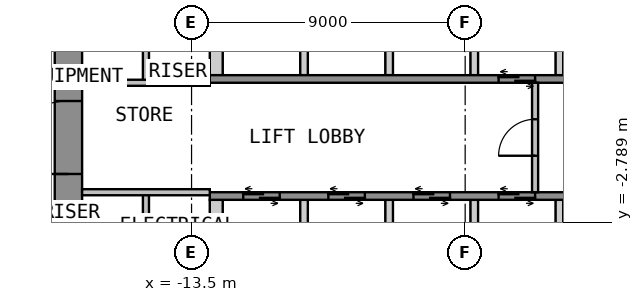
"""IFC4 building model, lengths in metres.
Left out: names, types, materials, properties, quantities, classifications, styles, units other than length and angle.
Written with IfcOpenShell. Run it as: python <this file> out.ifc"""

import sys

from ifc_helpers import new_model, si_unit, direction, frame, frame_2d, origin, place, context, subcontext, project, spatial, polyline, rectangle, outline, extrude, element, fill, save


model = new_model("IFC4")
c1 = context("Model", 3, precision=1e-05, world=origin(), true_north=direction((0.0, 1.0)))
c2 = subcontext(c1, "Body", "Model", "MODEL_VIEW")
j1 = project(units=[si_unit("LENGTHUNIT", "METRE"), si_unit("PLANEANGLEUNIT", "RADIAN")], contexts=[c1])
p1 = place(None, origin())
s1 = spatial("IfcSite", under=j1, at=p1, CompositionType="ELEMENT")
p2 = place(p1, origin())
s2 = spatial("IfcBuilding", under=s1, at=p2, CompositionType="ELEMENT")
p3 = place(p2, frame((0.0, 0.0, 6.0)))
s3 = spatial("IfcBuildingStorey", under=s2, at=p3, CompositionType="ELEMENT", Elevation=6.0)
p4 = place(p3, frame((-17.55, -12.6, 0.0), z_axis=(0.0, 0.0, 1.0), x_axis=(0.0, 1.0, 0.0)))
e1 = element("IfcWall", 1, at=p4, inside=s3, PredefinedType="SHEAR", context=c2, shape_type="SweptSolid", body=[
    extrude(rectangle(XDim=25.2, YDim=0.9, at=frame_2d((12.6, 0.0))), origin(), (0.0, 0.0, 1.0), 4.4),
])
p5 = place(p4, frame((11.4, 0.0, 0.0)))
e2 = element("IfcOpeningElement", 2, at=p5, cuts=e1, PredefinedType="OPENING", context=c2, shape_type="SweptSolid", body=[
    extrude(rectangle(XDim=2.4, YDim=2.1, at=frame_2d((1.2, 1.05))), frame((0.0, 0.46, 0.0), z_axis=(0.0, -1.0, 0.0), x_axis=(1.0, 0.0, 0.0)), (0.0, 0.0, 1.0), 0.92),
])
p6 = place(p3, origin())
e3 = element("IfcWall", 3, at=p6, inside=s3, PredefinedType="SHEAR", context=c2, shape_type="SweptSolid", body=[
    extrude(outline(polyline([(-12.9, 2.05), (-12.475, 2.05), (-12.475, 4.75), (-12.9, 4.75), (-12.9, 2.05)])), origin(), (0.0, 0.0, 1.0), 4.4),
])
p7 = place(p3, origin())
e4 = element("IfcWall", 4, at=p7, inside=s3, PredefinedType="SHEAR", context=c2, shape_type="SweptSolid", body=[
    extrude(outline(polyline([(-9.925, 2.05), (-9.675, 2.05), (-9.675, 4.75), (-9.925, 4.75), (-9.925, 2.05)])), origin(), (0.0, 0.0, 1.0), 4.4),
])
p8 = place(p3, origin())
e5 = element("IfcWall", 5, at=p8, inside=s3, PredefinedType="SHEAR", context=c2, shape_type="SweptSolid", body=[
    extrude(outline(polyline([(-7.125, 2.05), (-6.875, 2.05), (-6.875, 4.75), (-7.125, 4.75), (-7.125, 2.05)])), origin(), (0.0, 0.0, 1.0), 4.4),
])
p9 = place(p3, origin())
e6 = element("IfcWall", 6, at=p9, inside=s3, PredefinedType="SHEAR", context=c2, shape_type="SweptSolid", body=[
    extrude(outline(polyline([(-4.325, 2.05), (-4.075, 2.05), (-4.075, 4.75), (-4.325, 4.75), (-4.325, 2.05)])), origin(), (0.0, 0.0, 1.0), 4.4),
])
p10 = place(p3, origin())
e7 = element("IfcWall", 7, at=p10, inside=s3, PredefinedType="SHEAR", context=c2, shape_type="SweptSolid", body=[
    extrude(outline(polyline([(-1.525, 2.05), (-1.275, 2.05), (-1.275, 4.75), (-1.525, 4.75), (-1.525, 2.05)])), origin(), (0.0, 0.0, 1.0), 4.4),
])
p11 = place(p3, frame((-12.9, 1.925, 0.0), z_axis=(0.0, 0.0, 1.0), x_axis=(1.0, 0.0, 0.0)))
e8 = element("IfcWall", 8, at=p11, inside=s3, PredefinedType="SHEAR", context=c2, shape_type="SweptSolid", body=[
    extrude(rectangle(XDim=25.8, YDim=0.25, at=frame_2d((12.9, 0.0))), origin(), (0.0, 0.0, 1.0), 4.4),
])
p12 = place(p11, frame((9.5, 0.0, 0.0)))
e9 = element("IfcOpeningElement", 9, at=p12, cuts=e8, PredefinedType="OPENING", context=c2, shape_type="SweptSolid", body=[
    extrude(rectangle(XDim=1.2, YDim=2.1, at=frame_2d((0.6, 1.05))), frame((0.0, 0.135, 0.0), z_axis=(0.0, -1.0, 0.0), x_axis=(1.0, 0.0, 0.0)), (0.0, 0.0, 1.0), 0.27),
])
p13 = place(p11, frame((12.3, 0.0, 0.0)))
e10 = element("IfcOpeningElement", 10, at=p13, cuts=e8, PredefinedType="OPENING", context=c2, shape_type="SweptSolid", body=[
    extrude(rectangle(XDim=1.2, YDim=2.1, at=frame_2d((0.6, 1.05))), frame((0.0, 0.135, 0.0), z_axis=(0.0, -1.0, 0.0), x_axis=(1.0, 0.0, 0.0)), (0.0, 0.0, 1.0), 0.27),
])
p14 = place(p11, frame((15.1, 0.0, 0.0)))
e11 = element("IfcOpeningElement", 11, at=p14, cuts=e8, PredefinedType="OPENING", context=c2, shape_type="SweptSolid", body=[
    extrude(rectangle(XDim=1.2, YDim=2.1, at=frame_2d((0.6, 1.05))), frame((0.0, 0.135, 0.0), z_axis=(0.0, -1.0, 0.0), x_axis=(1.0, 0.0, 0.0)), (0.0, 0.0, 1.0), 0.27),
])
p15 = place(p11, frame((17.9, 0.0, 0.0)))
e12 = element("IfcOpeningElement", 12, at=p15, cuts=e8, PredefinedType="OPENING", context=c2, shape_type="SweptSolid", body=[
    extrude(rectangle(XDim=1.2, YDim=2.1, at=frame_2d((0.6, 1.05))), frame((0.0, 0.135, 0.0), z_axis=(0.0, -1.0, 0.0), x_axis=(1.0, 0.0, 0.0)), (0.0, 0.0, 1.0), 0.27),
])
p16 = place(p11, frame((20.7, 0.0, 0.0)))
e13 = element("IfcOpeningElement", 13, at=p16, cuts=e8, PredefinedType="OPENING", context=c2, shape_type="SweptSolid", body=[
    extrude(rectangle(XDim=1.2, YDim=2.1, at=frame_2d((0.6, 1.05))), frame((0.0, 0.135, 0.0), z_axis=(0.0, -1.0, 0.0), x_axis=(1.0, 0.0, 0.0)), (0.0, 0.0, 1.0), 0.27),
])
p17 = place(p11, frame((23.5, 0.0, 0.0)))
e14 = element("IfcOpeningElement", 14, at=p17, cuts=e8, PredefinedType="OPENING", context=c2, shape_type="SweptSolid", body=[
    extrude(rectangle(XDim=1.2, YDim=2.1, at=frame_2d((0.6, 1.05))), frame((0.0, 0.135, 0.0), z_axis=(0.0, -1.0, 0.0), x_axis=(1.0, 0.0, 0.0)), (0.0, 0.0, 1.0), 0.27),
])
p18 = place(p3, origin())
e15 = element("IfcWall", 15, at=p18, inside=s3, PredefinedType="SHEAR", context=c2, shape_type="SweptSolid", body=[
    extrude(outline(polyline([(-12.9, -4.75), (-12.475, -4.75), (-12.475, -2.05), (-12.9, -2.05), (-12.9, -4.75)])), origin(), (0.0, 0.0, 1.0), 4.4),
])
p19 = place(p3, origin())
e16 = element("IfcWall", 16, at=p19, inside=s3, PredefinedType="SHEAR", context=c2, shape_type="SweptSolid", body=[
    extrude(outline(polyline([(-9.925, -4.75), (-9.675, -4.75), (-9.675, -2.05), (-9.925, -2.05), (-9.925, -4.75)])), origin(), (0.0, 0.0, 1.0), 4.4),
])
p20 = place(p3, origin())
e17 = element("IfcWall", 17, at=p20, inside=s3, PredefinedType="SHEAR", context=c2, shape_type="SweptSolid", body=[
    extrude(outline(polyline([(-7.125, -4.75), (-6.875, -4.75), (-6.875, -2.05), (-7.125, -2.05), (-7.125, -4.75)])), origin(), (0.0, 0.0, 1.0), 4.4),
])
p21 = place(p3, origin())
e18 = element("IfcWall", 18, at=p21, inside=s3, PredefinedType="SHEAR", context=c2, shape_type="SweptSolid", body=[
    extrude(outline(polyline([(-4.325, -4.75), (-4.075, -4.75), (-4.075, -2.05), (-4.325, -2.05), (-4.325, -4.75)])), origin(), (0.0, 0.0, 1.0), 4.4),
])
p22 = place(p3, origin())
e19 = element("IfcWall", 19, at=p22, inside=s3, PredefinedType="SHEAR", context=c2, shape_type="SweptSolid", body=[
    extrude(outline(polyline([(-1.525, -4.75), (-1.275, -4.75), (-1.275, -2.05), (-1.525, -2.05), (-1.525, -4.75)])), origin(), (0.0, 0.0, 1.0), 4.4),
])
p23 = place(p3, frame((-12.9, -1.925, 0.0), z_axis=(0.0, 0.0, 1.0), x_axis=(1.0, 0.0, 0.0)))
e20 = element("IfcWall", 20, at=p23, inside=s3, PredefinedType="SHEAR", context=c2, shape_type="SweptSolid", body=[
    extrude(rectangle(XDim=25.8, YDim=0.25, at=frame_2d((12.9, 0.0))), origin(), (0.0, 0.0, 1.0), 4.4),
])
p24 = place(p23, frame((1.1, 0.0, 0.0)))
e21 = element("IfcOpeningElement", 21, at=p24, cuts=e20, PredefinedType="OPENING", context=c2, shape_type="SweptSolid", body=[
    extrude(rectangle(XDim=1.2, YDim=2.1, at=frame_2d((0.6, 1.05))), frame((0.0, 0.135, 0.0), z_axis=(0.0, -1.0, 0.0), x_axis=(1.0, 0.0, 0.0)), (0.0, 0.0, 1.0), 0.27),
])
p25 = place(p23, frame((3.9, 0.0, 0.0)))
e22 = element("IfcOpeningElement", 22, at=p25, cuts=e20, PredefinedType="OPENING", context=c2, shape_type="SweptSolid", body=[
    extrude(rectangle(XDim=1.2, YDim=2.1, at=frame_2d((0.6, 1.05))), frame((0.0, 0.135, 0.0), z_axis=(0.0, -1.0, 0.0), x_axis=(1.0, 0.0, 0.0)), (0.0, 0.0, 1.0), 0.27),
])
p26 = place(p23, frame((6.7, 0.0, 0.0)))
e23 = element("IfcOpeningElement", 23, at=p26, cuts=e20, PredefinedType="OPENING", context=c2, shape_type="SweptSolid", body=[
    extrude(rectangle(XDim=1.2, YDim=2.1, at=frame_2d((0.6, 1.05))), frame((0.0, 0.135, 0.0), z_axis=(0.0, -1.0, 0.0), x_axis=(1.0, 0.0, 0.0)), (0.0, 0.0, 1.0), 0.27),
])
p27 = place(p23, frame((9.5, 0.0, 0.0)))
e24 = element("IfcOpeningElement", 24, at=p27, cuts=e20, PredefinedType="OPENING", context=c2, shape_type="SweptSolid", body=[
    extrude(rectangle(XDim=1.2, YDim=2.1, at=frame_2d((0.6, 1.05))), frame((0.0, 0.135, 0.0), z_axis=(0.0, -1.0, 0.0), x_axis=(1.0, 0.0, 0.0)), (0.0, 0.0, 1.0), 0.27),
])
p28 = place(p23, frame((12.3, 0.0, 0.0)))
e25 = element("IfcOpeningElement", 25, at=p28, cuts=e20, PredefinedType="OPENING", context=c2, shape_type="SweptSolid", body=[
    extrude(rectangle(XDim=1.2, YDim=2.1, at=frame_2d((0.6, 1.05))), frame((0.0, 0.135, 0.0), z_axis=(0.0, -1.0, 0.0), x_axis=(1.0, 0.0, 0.0)), (0.0, 0.0, 1.0), 0.27),
])
p29 = place(p23, frame((15.1, 0.0, 0.0)))
e26 = element("IfcOpeningElement", 26, at=p29, cuts=e20, PredefinedType="OPENING", context=c2, shape_type="SweptSolid", body=[
    extrude(rectangle(XDim=1.2, YDim=2.1, at=frame_2d((0.6, 1.05))), frame((0.0, 0.135, 0.0), z_axis=(0.0, -1.0, 0.0), x_axis=(1.0, 0.0, 0.0)), (0.0, 0.0, 1.0), 0.27),
])
p30 = place(p3, frame((-2.2, -1.8, 0.0), z_axis=(0.0, 0.0, 1.0), x_axis=(0.0, 1.0, 0.0)))
e27 = element("IfcWall", 27, at=p30, inside=s3, PredefinedType="PARTITIONING", context=c2, shape_type="SweptSolid", body=[
    extrude(rectangle(XDim=3.6, YDim=0.2, at=frame_2d((1.8, 0.0))), origin(), (0.0, 0.0, 1.0), 4.4),
])
p31 = place(p30, frame((1.2, 0.0, 0.0)))
e28 = element("IfcOpeningElement", 28, at=p31, cuts=e27, PredefinedType="OPENING", context=c2, shape_type="SweptSolid", body=[
    extrude(rectangle(XDim=1.2, YDim=2.1, at=frame_2d((0.6, 1.05))), frame((0.0, 0.11, 0.0), z_axis=(0.0, -1.0, 0.0), x_axis=(1.0, 0.0, 0.0)), (0.0, 0.0, 1.0), 0.22),
])
p32 = place(p3, frame((-15.0, 1.8, 0.0), z_axis=(0.0, 0.0, 1.0), x_axis=(0.0, 1.0, 0.0)))
e29 = element("IfcWall", 29, at=p32, inside=s3, PredefinedType="PARTITIONING", context=c2, shape_type="SweptSolid", body=[
    extrude(rectangle(XDim=3.2, YDim=0.2, at=frame_2d((1.6, 0.0))), origin(), (0.0, 0.0, 1.0), 4.4),
])
p33 = place(p3, frame((-17.1, 1.8, 0.0), z_axis=(0.0, 0.0, 1.0), x_axis=(1.0, 0.0, 0.0)))
e30 = element("IfcWall", 30, at=p33, inside=s3, PredefinedType="PARTITIONING", context=c2, shape_type="SweptSolid", body=[
    extrude(rectangle(XDim=4.2, YDim=0.2, at=frame_2d((2.1, 0.0))), origin(), (0.0, 0.0, 1.0), 4.4),
])
p34 = place(p3, frame((-15.0, -5.0, 0.0), z_axis=(0.0, 0.0, 1.0), x_axis=(0.0, 1.0, 0.0)))
e31 = element("IfcWall", 31, at=p34, inside=s3, PredefinedType="PARTITIONING", context=c2, shape_type="SweptSolid", body=[
    extrude(rectangle(XDim=3.2, YDim=0.2, at=frame_2d((1.6, 0.0))), origin(), (0.0, 0.0, 1.0), 4.4),
])
p35 = place(p3, frame((-17.1, -1.8, 0.0), z_axis=(0.0, 0.0, 1.0), x_axis=(1.0, 0.0, 0.0)))
e32 = element("IfcWall", 32, at=p35, inside=s3, PredefinedType="PARTITIONING", context=c2, shape_type="SweptSolid", body=[
    extrude(rectangle(XDim=4.2, YDim=0.2, at=frame_2d((2.1, 0.0))), origin(), (0.0, 0.0, 1.0), 4.4),
])
p36 = place(p5, origin())
e33 = element("IfcDoor", 33, at=p36, inside=s3, OperationType="DOUBLE_DOOR_DOUBLE_SWING", PredefinedType="DOOR", context=c2, shape_type="SweptSolid", body=[
    extrude(rectangle(XDim=2.4, YDim=2.1, at=frame_2d((1.2, 1.05))), frame((0.0, 0.025, 0.0), z_axis=(0.0, -1.0, 0.0), x_axis=(1.0, 0.0, 0.0)), (0.0, 0.0, 1.0), 0.05),
])
fill(e2, e33)
p37 = place(p12, origin())
e34 = element("IfcDoor", 34, at=p37, inside=s3, OperationType="DOUBLE_DOOR_SLIDING", PredefinedType="DOOR", context=c2, shape_type="SweptSolid", body=[
    extrude(rectangle(XDim=1.2, YDim=2.1, at=frame_2d((0.6, 1.05))), frame((0.0, 0.025, 0.0), z_axis=(0.0, -1.0, 0.0), x_axis=(1.0, 0.0, 0.0)), (0.0, 0.0, 1.0), 0.05),
])
fill(e9, e34)
p38 = place(p24, origin())
e35 = element("IfcDoor", 35, at=p38, inside=s3, OperationType="DOUBLE_DOOR_SLIDING", PredefinedType="DOOR", context=c2, shape_type="SweptSolid", body=[
    extrude(rectangle(XDim=1.2, YDim=2.1, at=frame_2d((0.6, 1.05))), frame((0.0, 0.025, 0.0), z_axis=(0.0, -1.0, 0.0), x_axis=(1.0, 0.0, 0.0)), (0.0, 0.0, 1.0), 0.05),
])
fill(e21, e35)
p39 = place(p25, origin())
e36 = element("IfcDoor", 36, at=p39, inside=s3, OperationType="DOUBLE_DOOR_SLIDING", PredefinedType="DOOR", context=c2, shape_type="SweptSolid", body=[
    extrude(rectangle(XDim=1.2, YDim=2.1, at=frame_2d((0.6, 1.05))), frame((0.0, 0.025, 0.0), z_axis=(0.0, -1.0, 0.0), x_axis=(1.0, 0.0, 0.0)), (0.0, 0.0, 1.0), 0.05),
])
fill(e22, e36)
p40 = place(p26, origin())
e37 = element("IfcDoor", 37, at=p40, inside=s3, OperationType="DOUBLE_DOOR_SLIDING", PredefinedType="DOOR", context=c2, shape_type="SweptSolid", body=[
    extrude(rectangle(XDim=1.2, YDim=2.1, at=frame_2d((0.6, 1.05))), frame((0.0, 0.025, 0.0), z_axis=(0.0, -1.0, 0.0), x_axis=(1.0, 0.0, 0.0)), (0.0, 0.0, 1.0), 0.05),
])
fill(e23, e37)
p41 = place(p27, origin())
e38 = element("IfcDoor", 38, at=p41, inside=s3, OperationType="DOUBLE_DOOR_SLIDING", PredefinedType="DOOR", context=c2, shape_type="SweptSolid", body=[
    extrude(rectangle(XDim=1.2, YDim=2.1, at=frame_2d((0.6, 1.05))), frame((0.0, 0.025, 0.0), z_axis=(0.0, -1.0, 0.0), x_axis=(1.0, 0.0, 0.0)), (0.0, 0.0, 1.0), 0.05),
])
fill(e24, e38)
p42 = place(p31, origin())
e39 = element("IfcDoor", 39, at=p42, inside=s3, OperationType="SINGLE_SWING_LEFT", PredefinedType="DOOR", context=c2, shape_type="SweptSolid", body=[
    extrude(rectangle(XDim=1.2, YDim=2.1, at=frame_2d((0.6, 1.05))), frame((0.0, 0.025, 0.0), z_axis=(0.0, -1.0, 0.0), x_axis=(1.0, 0.0, 0.0)), (0.0, 0.0, 1.0), 0.05),
])
fill(e28, e39)
save(model, sys.argv[1])
